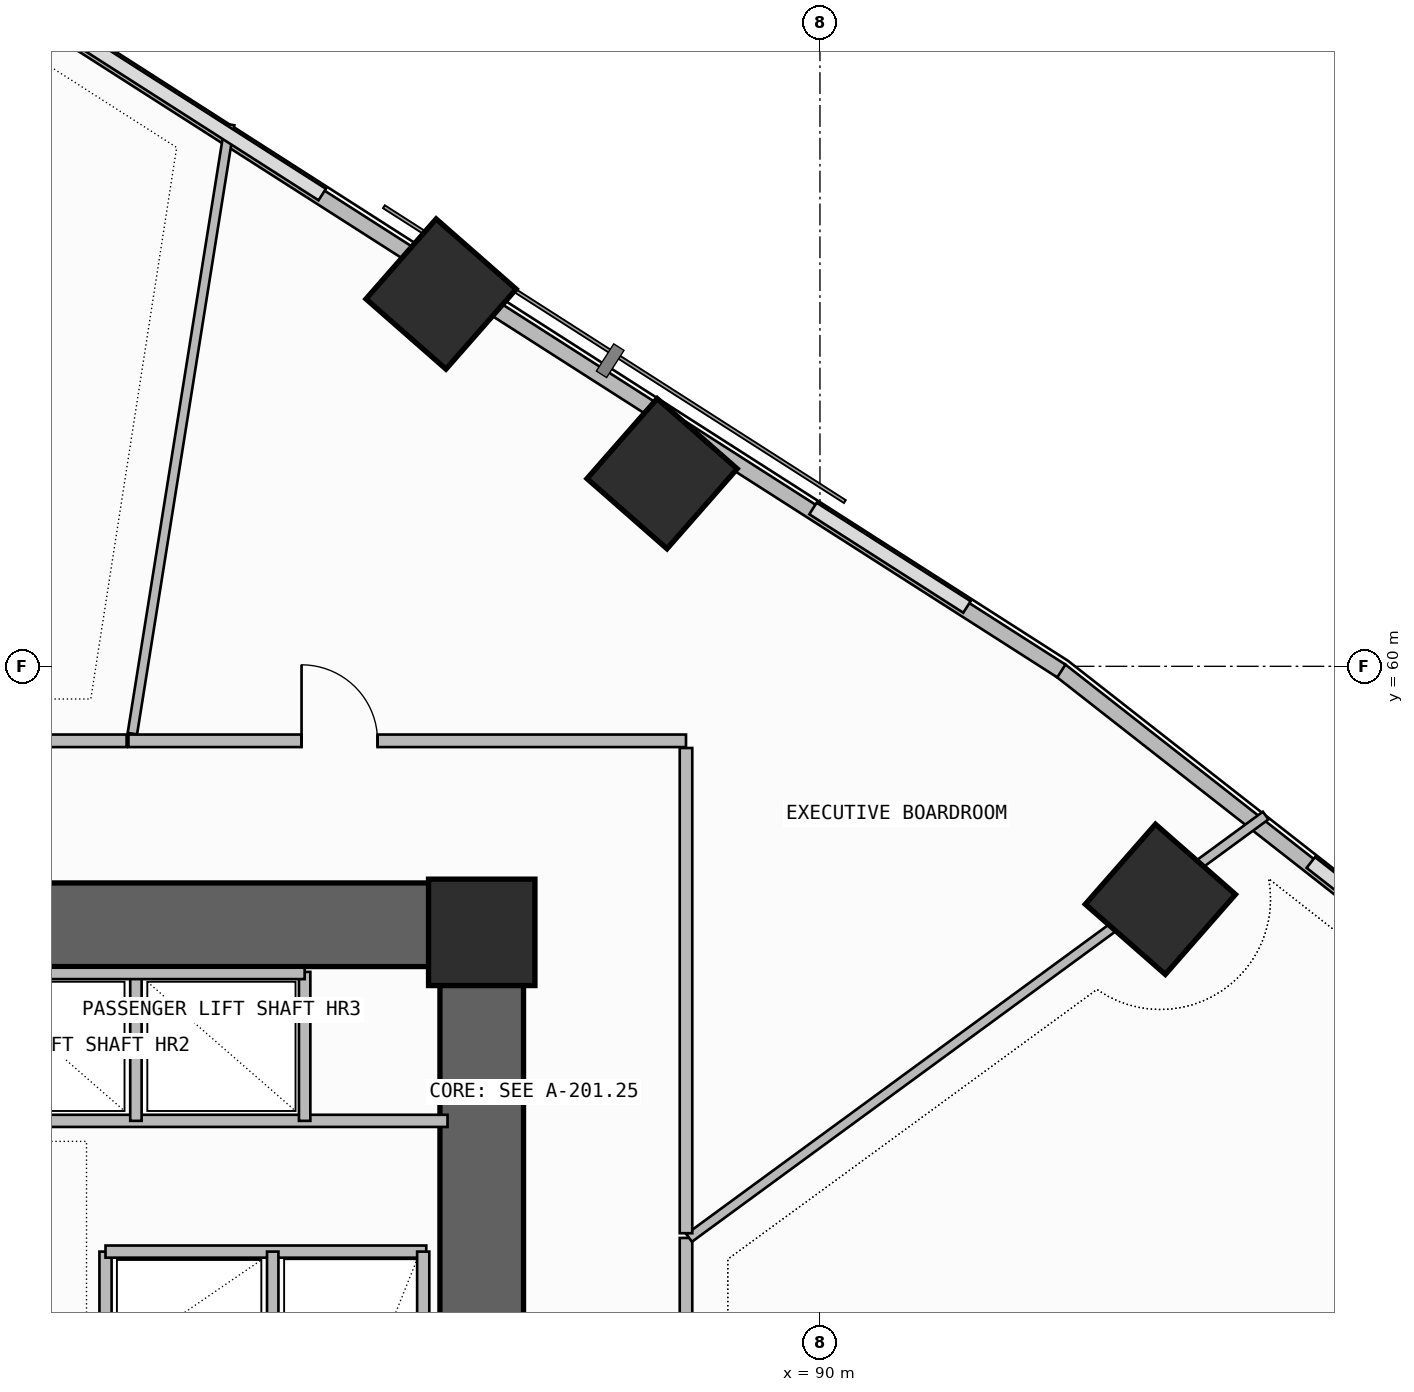
"""IFC4 building model, lengths in metres.
Left out: names, types, materials, properties, quantities, classifications, styles, units other than length and angle.
Written with IfcOpenShell. Run it as: python <this file> out.ifc"""

import sys

from ifc_helpers import new_model, si_unit, direction, frame, frame_2d, origin, origin_2d, place, context, subcontext, project, spatial, rectangle, extrude, element, fill, save


model = new_model("IFC4")
c1 = context("Model", 3, precision=1e-05, world=origin(), true_north=direction((0.0, 1.0)))
c2 = subcontext(c1, "Body", "Model", "MODEL_VIEW")
j1 = project(units=[si_unit("LENGTHUNIT", "METRE"), si_unit("PLANEANGLEUNIT", "RADIAN")], contexts=[c1])
p1 = place(None, origin())
s1 = spatial("IfcSite", under=j1, at=p1, CompositionType="ELEMENT")
p2 = place(p1, origin())
s2 = spatial("IfcBuilding", under=s1, at=p2, CompositionType="ELEMENT")
p3 = place(p2, frame((0.0, 0.0, 88.5)))
s3 = spatial("IfcBuildingStorey", under=s2, at=p3, CompositionType="ELEMENT", Elevation=88.5)
p4 = place(p3, frame((71.8, 56.6, -0.26), z_axis=(0.0, 0.0, 1.0), x_axis=(1.0, 0.0, 0.0)))
e1 = element("IfcWall", 1, at=p4, inside=s3, PredefinedType="SHEAR", context=c2, shape_type="SweptSolid", body=[
    extrude(rectangle(XDim=14.3, YDim=1.1, at=frame_2d((7.15, 0.0))), origin(), (0.0, 0.0, 1.0), 3.6),
])
p5 = place(p3, frame((85.55, 47.6, -0.26), z_axis=(0.0, 0.0, 1.0), x_axis=(0.0, 1.0, 0.0)))
e2 = element("IfcWall", 2, at=p5, inside=s3, PredefinedType="SHEAR", context=c2, shape_type="SweptSolid", body=[
    extrude(rectangle(XDim=8.45, YDim=1.1, at=frame_2d((4.225, 0.0))), origin(), (0.0, 0.0, 1.0), 3.6),
])
for number, where, z_axis, x_axis in (
    (3, (85.55, 56.5, 0.0), (0.0, 0.0, 1.0), (1.0, 0.0, 0.0)),
    (4, (94.479, 56.935, 0.0), (0.0, 0.0, 1.0), (0.659, 0.752, 0.0)),
    (5, (87.923, 62.534, 0.0), (0.0, 0.0, 1.0), (0.659, 0.752, 0.0)),
    (6, (85.015, 64.898, 0.0), (0.0, 0.0, 1.0), (0.659, 0.752, 0.0)),
):
    element("IfcColumn", number, at=place(p3, frame(where, z_axis=z_axis, x_axis=x_axis)), inside=s3, PredefinedType="COLUMN", context=c2, shape_type="SweptSolid", body=[
        extrude(rectangle(XDim=1.4, YDim=1.4, at=origin_2d()), origin(), (0.0, 0.0, 1.0), 3.6),
    ])
p6 = place(p3, frame((121.476, 37.781, 0.0), z_axis=(0.0, 0.0, 1.0), x_axis=(-0.787385636484, 0.61646075257, 0.0)))
e7 = element("IfcWall", 7, at=p6, inside=s3, PredefinedType="PARAPET", context=c2, shape_type="SweptSolid", body=[
    extrude(rectangle(XDim=35.957, YDim=0.2, at=frame_2d((17.979, 0.0))), origin(), (0.0, 0.0, 1.0), 1.15),
])
p7 = place(p3, frame((93.176, 59.939, 0.0), z_axis=(0.0, 0.0, 1.0), x_axis=(-0.842413081081, 0.538832256666, 0.0)))
e8 = element("IfcWall", 8, at=p7, inside=s3, PredefinedType="PARAPET", context=c2, shape_type="SweptSolid", body=[
    extrude(rectangle(XDim=9.011, YDim=0.2, at=frame_2d((4.505, 0.0))), origin(), (0.0, 0.0, 1.0), 1.15),
])
p8 = place(p3, frame((84.682, 65.372, 0.0), z_axis=(0.0, 0.0, 1.0), x_axis=(-0.842418773655, 0.538823356763, 0.0)))
e9 = element("IfcWall", 9, at=p8, inside=s3, PredefinedType="PARAPET", context=c2, shape_type="SweptSolid", body=[
    extrude(rectangle(XDim=19.612, YDim=0.2, at=frame_2d((9.806, 0.0))), origin(), (0.0, 0.0, 1.0), 1.15),
])
p9 = place(p3, frame((80.6, 47.7, 0.0), z_axis=(0.0, 0.0, 1.0), x_axis=(0.0, 1.0, 0.0)))
e10 = element("IfcWall", 10, at=p9, inside=s3, PredefinedType="SOLIDWALL", context=c2, shape_type="SweptSolid", body=[
    extrude(rectangle(XDim=4.6, YDim=0.16, at=frame_2d((2.3, 0.0))), origin(), (0.0, 0.0, 1.0), 3.34),
])
p10 = place(p3, frame((80.6, 52.3, 0.0), z_axis=(0.0, 0.0, 1.0), x_axis=(1.0, 0.0, 0.0)))
e11 = element("IfcWall", 11, at=p10, inside=s3, PredefinedType="SOLIDWALL", context=c2, shape_type="SweptSolid", body=[
    extrude(rectangle(XDim=4.22, YDim=0.16, at=frame_2d((2.11, 0.0))), origin(), (0.0, 0.0, 1.0), 3.34),
])
p11 = place(p3, frame((82.8, 47.7, 0.0), z_axis=(0.0, 0.0, 1.0), x_axis=(0.0, 1.0, 0.0)))
e12 = element("IfcWall", 12, at=p11, inside=s3, PredefinedType="PLUMBINGWALL", context=c2, shape_type="SweptSolid", body=[
    extrude(rectangle(XDim=4.6, YDim=0.15, at=frame_2d((2.3, 0.0))), origin(), (0.0, 0.0, 1.0), 3.34),
])
p12 = place(p3, frame((84.78, 47.7, 0.0), z_axis=(0.0, 0.0, 1.0), x_axis=(0.0, 1.0, 0.0)))
e13 = element("IfcWall", 13, at=p12, inside=s3, PredefinedType="SOLIDWALL", context=c2, shape_type="SweptSolid", body=[
    extrude(rectangle(XDim=4.6, YDim=0.16, at=frame_2d((2.3, 0.0))), origin(), (0.0, 0.0, 1.0), 3.34),
])
p13 = place(p3, frame((73.02, 54.02, 0.0), z_axis=(0.0, 0.0, 1.0), x_axis=(1.0, 0.0, 0.0)))
e14 = element("IfcWall", 14, at=p13, inside=s3, PredefinedType="SOLIDWALL", context=c2, shape_type="SweptSolid", body=[
    extrude(rectangle(XDim=12.08, YDim=0.16, at=frame_2d((6.04, 0.0))), origin(), (0.0, 0.0, 1.0), 3.34),
])
p14 = place(p3, frame((81.0, 54.02, 0.0), z_axis=(0.0, 0.0, 1.0), x_axis=(0.0, 1.0, 0.0)))
e15 = element("IfcWall", 15, at=p14, inside=s3, PredefinedType="PLUMBINGWALL", context=c2, shape_type="SweptSolid", body=[
    extrude(rectangle(XDim=1.96, YDim=0.15, at=frame_2d((0.98, 0.0))), origin(), (0.0, 0.0, 1.0), 3.34),
])
p15 = place(p3, frame((83.22, 54.02, 0.0), z_axis=(0.0, 0.0, 1.0), x_axis=(0.0, 1.0, 0.0)))
e16 = element("IfcWall", 16, at=p15, inside=s3, PredefinedType="SOLIDWALL", context=c2, shape_type="SweptSolid", body=[
    extrude(rectangle(XDim=1.96, YDim=0.15, at=frame_2d((0.98, 0.0))), origin(), (0.0, 0.0, 1.0), 3.34),
])
p16 = place(p3, frame((76.52, 55.96, 0.0), z_axis=(0.0, 0.0, 1.0), x_axis=(1.0, 0.0, 0.0)))
e17 = element("IfcWall", 17, at=p16, inside=s3, PredefinedType="SOLIDWALL", context=c2, shape_type="SweptSolid", body=[
    extrude(rectangle(XDim=6.7, YDim=0.15, at=frame_2d((3.35, 0.0))), origin(), (0.0, 0.0, 1.0), 3.34),
])
p17 = place(p3, frame((88.238, 44.143, 0.0), z_axis=(0.0, 0.0, 1.0), x_axis=(0.0, 1.0, 0.0)))
e18 = element("IfcWall", 18, at=p17, inside=s3, PredefinedType="PARTITIONING", context=c2, shape_type="SweptSolid", body=[
    extrude(rectangle(XDim=8.337, YDim=0.165, at=frame_2d((4.168, 0.0))), origin(), (0.0, 0.0, 1.0), 3.34),
])
p18 = place(p17, frame((1.726, 0.0, 0.0)))
e19 = element("IfcOpeningElement", 19, at=p18, cuts=e18, PredefinedType="OPENING", context=c2, shape_type="SweptSolid", body=[
    extrude(rectangle(XDim=1.0, YDim=2.2, at=frame_2d((0.5, 1.1))), frame((0.0, 0.093, 0.0), z_axis=(0.0, -1.0, 0.0), x_axis=(1.0, 0.0, 0.0)), (0.0, 0.0, 1.0), 0.185),
])
p19 = place(p3, frame((88.279, 52.48, 0.0), z_axis=(0.0, 0.0, 1.0), x_axis=(0.80669792857, 0.590964002323, 0.0)))
e20 = element("IfcWall", 20, at=p19, inside=s3, PredefinedType="PARTITIONING", context=c2, shape_type="SweptSolid", body=[
    extrude(rectangle(XDim=9.403, YDim=0.125, at=frame_2d((4.702, 0.0))), origin(), (0.0, 0.0, 1.0), 2.725),
])
p20 = place(p3, frame((88.238, 59.02, 0.0), z_axis=(0.0, 0.0, 1.0), x_axis=(-1.0, 0.0, 0.0)))
e21 = element("IfcWall", 21, at=p20, inside=s3, PredefinedType="PARTITIONING", context=c2, shape_type="SweptSolid", body=[
    extrude(rectangle(XDim=7.336, YDim=0.165, at=frame_2d((3.668, 0.0))), origin(), (0.0, 0.0, 1.0), 2.725),
])
p21 = place(p20, frame((4.058, 0.0, 0.0)))
e22 = element("IfcOpeningElement", 22, at=p21, cuts=e21, PredefinedType="OPENING", context=c2, shape_type="SweptSolid", body=[
    extrude(rectangle(XDim=1.0, YDim=2.2, at=frame_2d((0.5, 1.1))), frame((0.0, 0.093, 0.0), z_axis=(0.0, -1.0, 0.0), x_axis=(1.0, 0.0, 0.0)), (0.0, 0.0, 1.0), 0.185),
])
p22 = place(p3, frame((88.238, 52.542, 0.0), z_axis=(0.0, 0.0, 1.0), x_axis=(0.0, 1.0, 0.0)))
e23 = element("IfcWall", 23, at=p22, inside=s3, PredefinedType="PARTITIONING", context=c2, shape_type="SweptSolid", body=[
    extrude(rectangle(XDim=6.384, YDim=0.165, at=frame_2d((3.192, 0.0))), origin(), (0.0, 0.0, 1.0), 2.725),
])
p23 = place(p3, frame((80.953, 59.115, 0.0), z_axis=(0.0, 0.0, 1.0), x_axis=(0.157731190012, 0.987482086773, 0.0)))
e24 = element("IfcWall", 24, at=p23, inside=s3, PredefinedType="PARTITIONING", context=c2, shape_type="SweptSolid", body=[
    extrude(rectangle(XDim=8.115, YDim=0.125, at=frame_2d((4.058, 0.0))), origin(), (0.0, 0.0, 1.0), 2.875),
])
p24 = place(p3, frame((80.877, 59.02, 0.0), z_axis=(0.0, 0.0, 1.0), x_axis=(-1.0, 0.0, 0.0)))
e25 = element("IfcWall", 25, at=p24, inside=s3, PredefinedType="PARTITIONING", context=c2, shape_type="SweptSolid", body=[
    extrude(rectangle(XDim=11.498, YDim=0.165, at=frame_2d((5.749, 0.0))), origin(), (0.0, 0.0, 1.0), 2.725),
])
p25 = place(p24, frame((5.249, 0.0, 0.0)))
e26 = element("IfcOpeningElement", 26, at=p25, cuts=e25, PredefinedType="OPENING", context=c2, shape_type="SweptSolid", body=[
    extrude(rectangle(XDim=1.0, YDim=2.2, at=frame_2d((0.5, 1.1))), frame((0.0, 0.093, 0.0), z_axis=(0.0, -1.0, 0.0), x_axis=(1.0, 0.0, 0.0)), (0.0, 0.0, 1.0), 0.185),
])
p26 = place(p21, frame((1.0, 0.0, 0.0), z_axis=(0.0, 0.0, 1.0), x_axis=(-1.0, 0.0, 0.0)))
e27 = element("IfcDoor", 27, at=p26, inside=s3, OperationType="SINGLE_SWING_LEFT", PredefinedType="DOOR", context=c2, shape_type="SweptSolid", body=[
    extrude(rectangle(XDim=1.0, YDim=2.2, at=frame_2d((0.5, 1.1))), frame((0.0, 0.025, 0.0), z_axis=(0.0, -1.0, 0.0), x_axis=(1.0, 0.0, 0.0)), (0.0, 0.0, 1.0), 0.05),
])
fill(e22, e27)
save(model, sys.argv[1])
